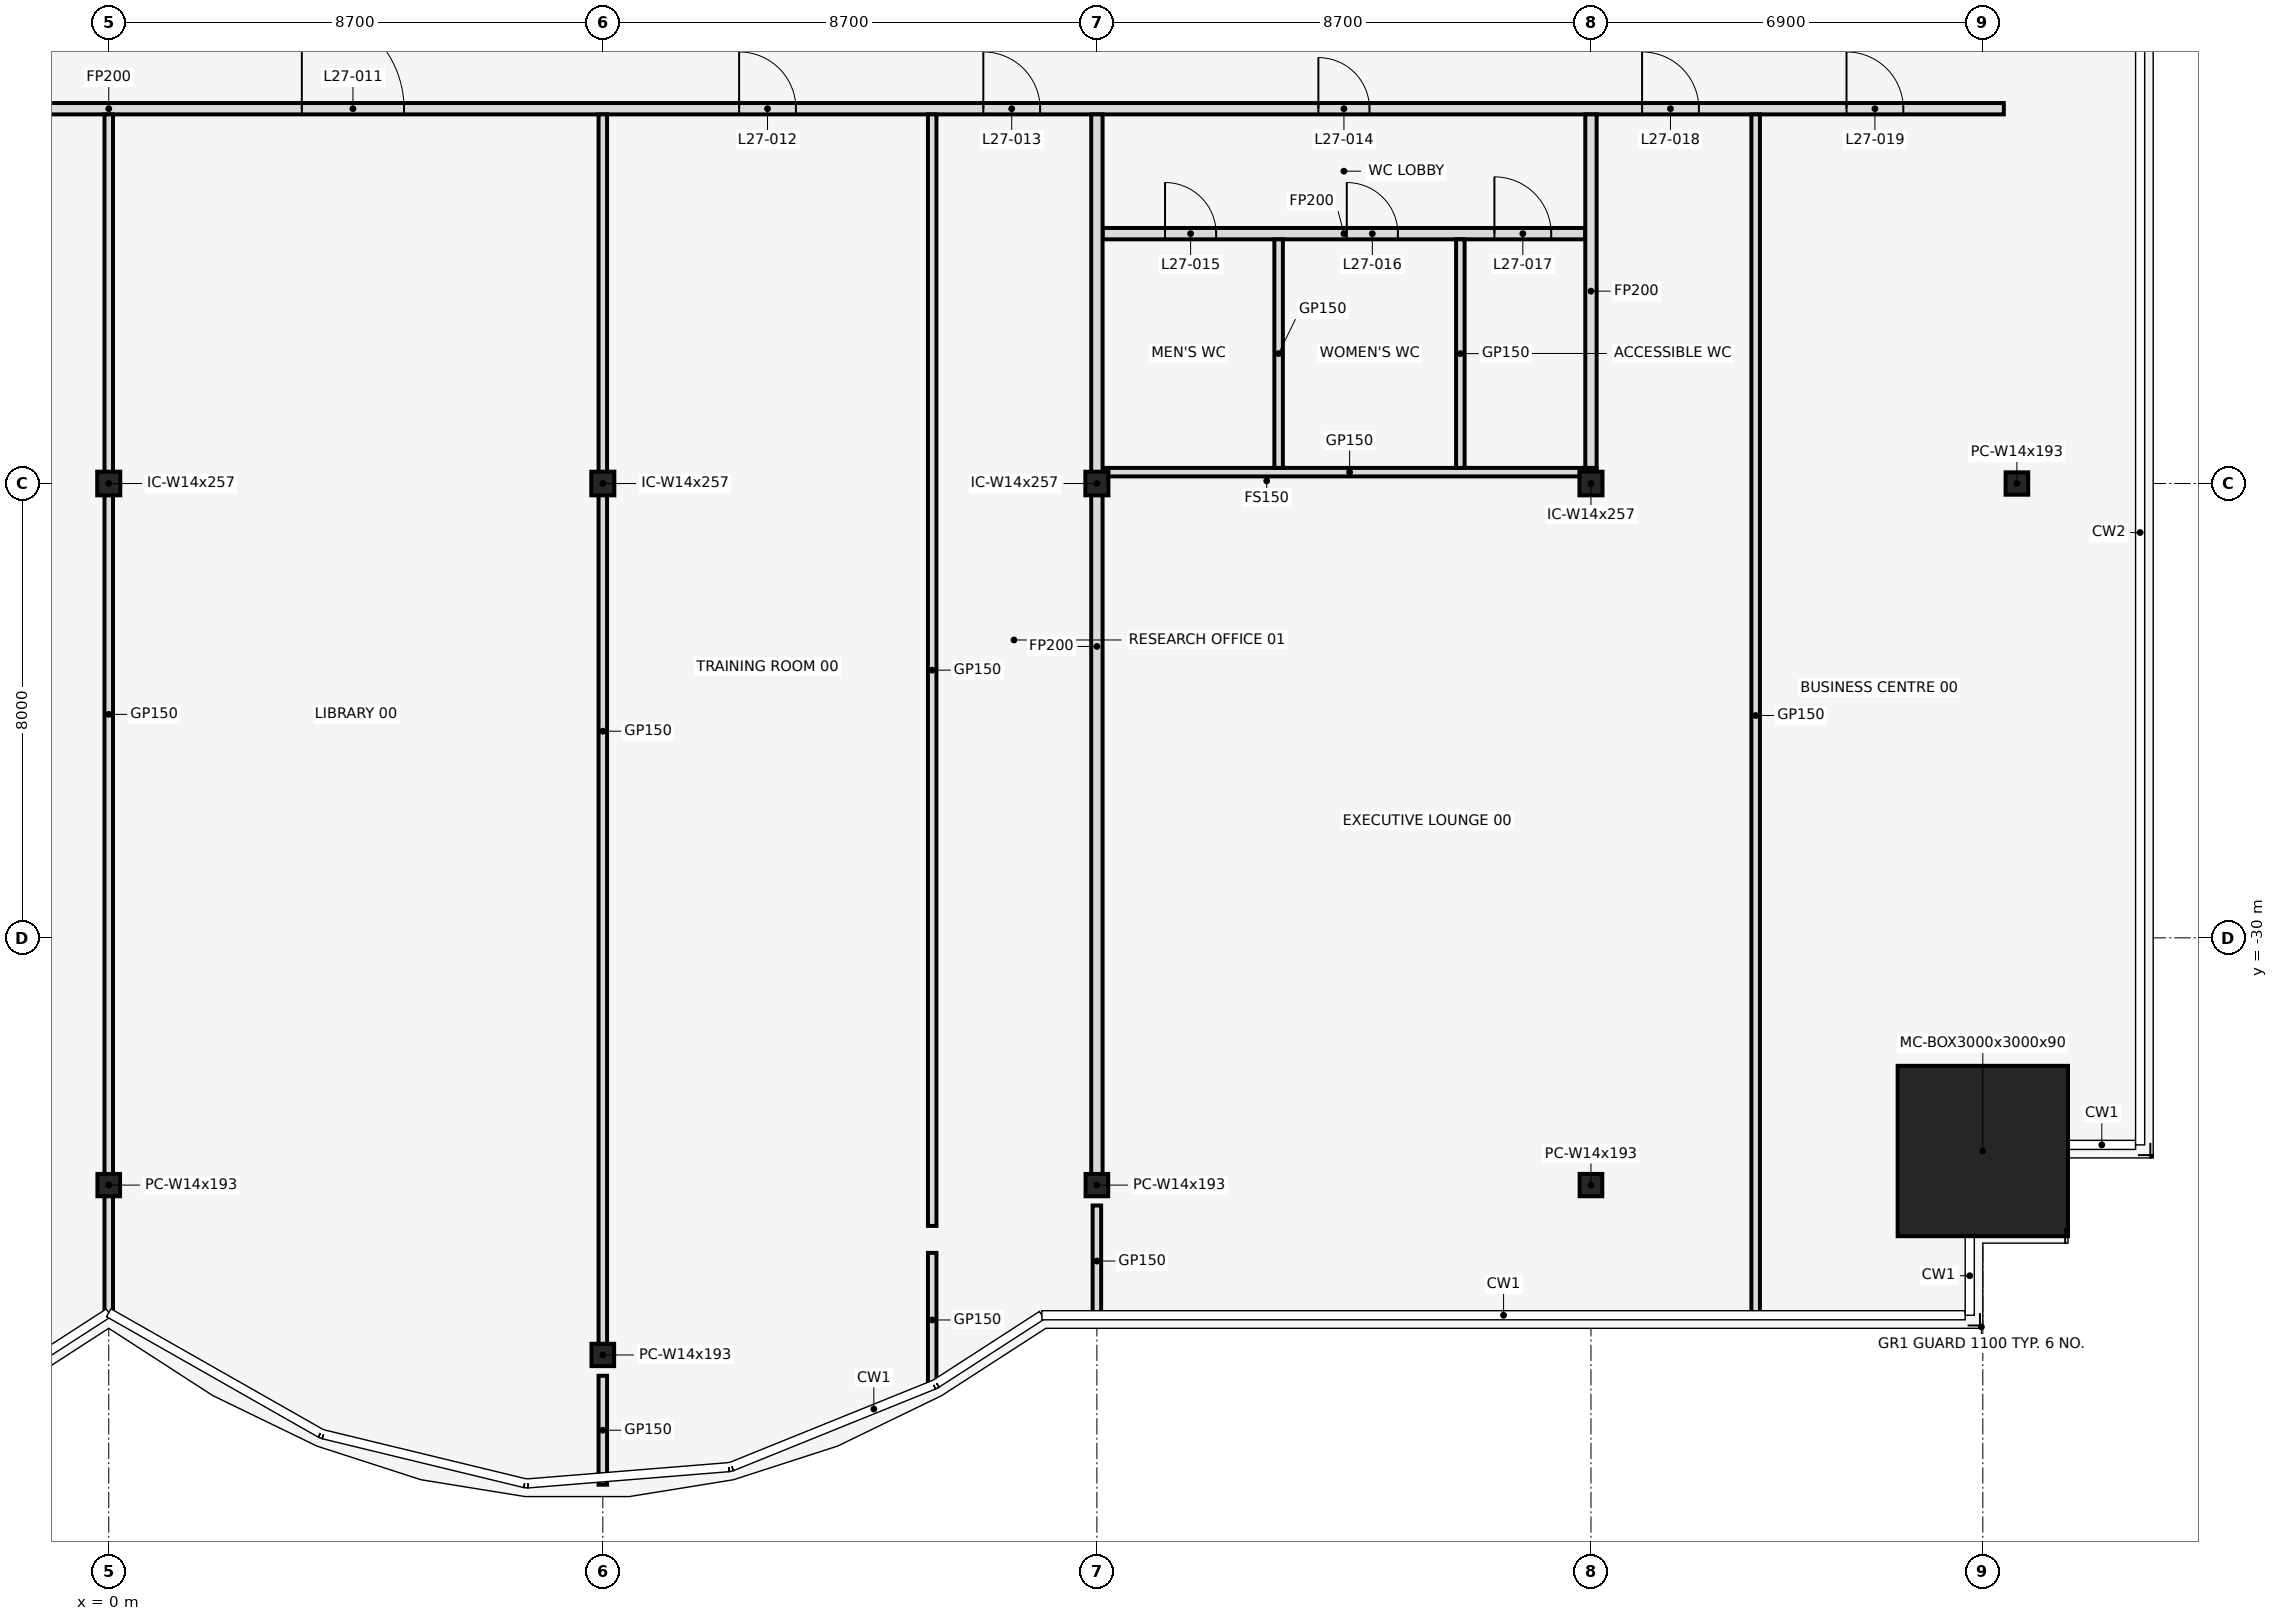
"""IFC4 building model, lengths in metres.
Left out: names, types, materials, properties, quantities, classifications, styles, units other than length and angle.
Written with IfcOpenShell. Run it as: python <this file> out.ifc"""

import sys

from ifc_helpers import new_model, si_unit, direction, frame, frame_2d, origin, origin_2d, place, context, subcontext, project, spatial, rectangle, hollow_rectangle, i_section, extrude, element, fill, save


model = new_model("IFC4")
c1 = context("Model", 3, precision=1e-05, world=origin(), true_north=direction((0.0, 1.0)))
c2 = subcontext(c1, "Body", "Model", "MODEL_VIEW")
j1 = project(units=[si_unit("LENGTHUNIT", "METRE"), si_unit("PLANEANGLEUNIT", "RADIAN")], contexts=[c1])
p1 = place(None, origin())
s1 = spatial("IfcSite", under=j1, at=p1, CompositionType="ELEMENT")
p2 = place(p1, origin())
s2 = spatial("IfcBuilding", under=s1, at=p2, CompositionType="ELEMENT")
p3 = place(p2, frame((0.0, 0.0, 126.8)))
s3 = spatial("IfcBuildingStorey", under=s2, at=p3, CompositionType="ELEMENT", Elevation=126.8)
for number, where, z_axis, x_axis in (
    (1, (0.0, -34.354, 0.0), (0.0, 0.0, 1.0), (1.0, 0.0, 0.0)),
    (2, (8.7, -37.345, 0.0), (0.0, 0.0, 1.0), (1.0, 0.0, 0.0)),
    (3, (17.4, -34.354, 0.0), (0.0, 0.0, 1.0), (1.0, 0.0, 0.0)),
    (4, (26.1, -34.354, 0.0), (0.0, 0.0, 1.0), (1.0, 0.0, 0.0)),
):
    element("IfcColumn", number, at=place(p3, frame(where, z_axis=z_axis, x_axis=x_axis)), inside=s3, PredefinedType="COLUMN", context=c2, shape_type="SweptSolid", body=[
        extrude(i_section(OverallWidth=0.399, OverallDepth=0.394, WebThickness=0.023, FlangeThickness=0.037, at=origin_2d()), origin(), (0.0, 0.0, 1.0), 4.1),
    ])
p4 = place(p3, frame((33.0, -33.754, 0.0), z_axis=(0.0, 0.0, 1.0), x_axis=(1.0, 0.0, 0.0)))
e5 = element("IfcColumn", 5, at=p4, inside=s3, PredefinedType="COLUMN", context=c2, shape_type="SweptSolid", body=[
    extrude(hollow_rectangle(XDim=3.0, YDim=3.0, WallThickness=0.09, at=origin_2d()), origin(), (0.0, 0.0, 1.0), 4.1),
])
p5 = place(p3, frame((33.6, -22.0, 0.0), z_axis=(0.0, 0.0, 1.0), x_axis=(1.0, 0.0, 0.0)))
e6 = element("IfcColumn", 6, at=p5, inside=s3, PredefinedType="COLUMN", context=c2, shape_type="SweptSolid", body=[
    extrude(i_section(OverallWidth=0.399, OverallDepth=0.394, WebThickness=0.023, FlangeThickness=0.037, at=origin_2d()), origin(), (0.0, 0.0, 1.0), 4.1),
])
for number, where, z_axis, x_axis in (
    (7, (0.0, -22.0, 0.0), (0.0, 0.0, 1.0), (1.0, 0.0, 0.0)),
    (8, (8.7, -22.0, 0.0), (0.0, 0.0, 1.0), (1.0, 0.0, 0.0)),
    (9, (17.4, -22.0, 0.0), (0.0, 0.0, 1.0), (1.0, 0.0, 0.0)),
    (10, (26.1, -22.0, 0.0), (0.0, 0.0, 1.0), (1.0, 0.0, 0.0)),
):
    element("IfcColumn", number, at=place(p3, frame(where, z_axis=z_axis, x_axis=x_axis)), inside=s3, PredefinedType="COLUMN", context=c2, shape_type="SweptSolid", body=[
        extrude(i_section(OverallWidth=0.406, OverallDepth=0.417, WebThickness=0.03, FlangeThickness=0.048, at=origin_2d()), origin(), (0.0, 0.0, 1.0), 4.1),
    ])
p6 = place(p3, frame((17.5, -21.8, 0.0), z_axis=(0.0, 0.0, 1.0), x_axis=(1.0, 0.0, 0.0)))
e11 = element("IfcWall", 11, at=p6, inside=s3, PredefinedType="PARTITIONING", context=c2, shape_type="SweptSolid", body=[
    extrude(rectangle(XDim=8.7, YDim=0.15, at=frame_2d((4.35, 0.0))), origin(), (0.0, 0.0, 1.0), 2.939),
])
p7 = place(p3, frame((17.5, -17.6, 0.0), z_axis=(0.0, 0.0, 1.0), x_axis=(1.0, 0.0, 0.0)))
e12 = element("IfcWall", 12, at=p7, inside=s3, PredefinedType="PARTITIONING", context=c2, shape_type="SweptSolid", body=[
    extrude(rectangle(XDim=8.5, YDim=0.2, at=frame_2d((4.25, 0.0))), origin(), (0.0, 0.0, 1.0), 2.939),
])
p8 = place(p7, frame((1.1, 0.0, 0.0)))
e13 = element("IfcOpeningElement", 13, at=p8, cuts=e12, PredefinedType="OPENING", context=c2, shape_type="SweptSolid", body=[
    extrude(rectangle(XDim=0.9, YDim=2.1, at=frame_2d((0.45, 1.05))), frame((0.0, 0.112, 0.0), z_axis=(0.0, -1.0, 0.0), x_axis=(1.0, 0.0, 0.0)), (0.0, 0.0, 1.0), 0.224),
])
p9 = place(p7, frame((4.3, 0.0, 0.0)))
e14 = element("IfcOpeningElement", 14, at=p9, cuts=e12, PredefinedType="OPENING", context=c2, shape_type="SweptSolid", body=[
    extrude(rectangle(XDim=0.9, YDim=2.1, at=frame_2d((0.45, 1.05))), frame((0.0, 0.112, 0.0), z_axis=(0.0, -1.0, 0.0), x_axis=(1.0, 0.0, 0.0)), (0.0, 0.0, 1.0), 0.224),
])
p10 = place(p7, frame((6.9, 0.0, 0.0)))
e15 = element("IfcOpeningElement", 15, at=p10, cuts=e12, PredefinedType="OPENING", context=c2, shape_type="SweptSolid", body=[
    extrude(rectangle(XDim=1.0, YDim=2.1, at=frame_2d((0.5, 1.05))), frame((0.0, 0.112, 0.0), z_axis=(0.0, -1.0, 0.0), x_axis=(1.0, 0.0, 0.0)), (0.0, 0.0, 1.0), 0.224),
])
p11 = place(p3, frame((-33.37, -15.4, 0.0), z_axis=(0.0, 0.0, 1.0), x_axis=(1.0, 0.0, 0.0)))
e16 = element("IfcWall", 16, at=p11, inside=s3, PredefinedType="PARTITIONING", context=c2, shape_type="SweptSolid", body=[
    extrude(rectangle(XDim=66.74, YDim=0.2, at=frame_2d((33.37, 0.0))), origin(), (0.0, 0.0, 1.0), 2.939),
])
p12 = place(p11, frame((1.7, 0.0, 0.0)))
e17 = element("IfcOpeningElement", 17, at=p12, cuts=e16, PredefinedType="OPENING", context=c2, shape_type="SweptSolid", body=[
    extrude(rectangle(XDim=1.0, YDim=2.1, at=frame_2d((0.5, 1.05))), frame((0.0, 0.112, 0.0), z_axis=(0.0, -1.0, 0.0), x_axis=(1.0, 0.0, 0.0)), (0.0, 0.0, 1.0), 0.224),
])
p13 = place(p11, frame((11.07, 0.0, 0.0)))
e18 = element("IfcOpeningElement", 18, at=p13, cuts=e16, PredefinedType="OPENING", context=c2, shape_type="SweptSolid", body=[
    extrude(rectangle(XDim=1.0, YDim=2.1, at=frame_2d((0.5, 1.05))), frame((0.0, 0.112, 0.0), z_axis=(0.0, -1.0, 0.0), x_axis=(1.0, 0.0, 0.0)), (0.0, 0.0, 1.0), 0.224),
])
p14 = place(p11, frame((20.87, 0.0, 0.0)))
e19 = element("IfcOpeningElement", 19, at=p14, cuts=e16, PredefinedType="OPENING", context=c2, shape_type="SweptSolid", body=[
    extrude(rectangle(XDim=1.8, YDim=2.1, at=frame_2d((0.9, 1.05))), frame((0.0, 0.112, 0.0), z_axis=(0.0, -1.0, 0.0), x_axis=(1.0, 0.0, 0.0)), (0.0, 0.0, 1.0), 0.224),
])
p15 = place(p11, frame((28.57, 0.0, 0.0)))
e20 = element("IfcOpeningElement", 20, at=p15, cuts=e16, PredefinedType="OPENING", context=c2, shape_type="SweptSolid", body=[
    extrude(rectangle(XDim=1.0, YDim=2.1, at=frame_2d((0.5, 1.05))), frame((0.0, 0.112, 0.0), z_axis=(0.0, -1.0, 0.0), x_axis=(1.0, 0.0, 0.0)), (0.0, 0.0, 1.0), 0.224),
])
p16 = place(p11, frame((36.77, 0.0, 0.0)))
e21 = element("IfcOpeningElement", 21, at=p16, cuts=e16, PredefinedType="OPENING", context=c2, shape_type="SweptSolid", body=[
    extrude(rectangle(XDim=1.8, YDim=2.1, at=frame_2d((0.9, 1.05))), frame((0.0, 0.112, 0.0), z_axis=(0.0, -1.0, 0.0), x_axis=(1.0, 0.0, 0.0)), (0.0, 0.0, 1.0), 0.224),
])
p17 = place(p11, frame((44.47, 0.0, 0.0)))
e22 = element("IfcOpeningElement", 22, at=p17, cuts=e16, PredefinedType="OPENING", context=c2, shape_type="SweptSolid", body=[
    extrude(rectangle(XDim=1.0, YDim=2.1, at=frame_2d((0.5, 1.05))), frame((0.0, 0.112, 0.0), z_axis=(0.0, -1.0, 0.0), x_axis=(1.0, 0.0, 0.0)), (0.0, 0.0, 1.0), 0.224),
])
p18 = place(p11, frame((48.77, 0.0, 0.0)))
e23 = element("IfcOpeningElement", 23, at=p18, cuts=e16, PredefinedType="OPENING", context=c2, shape_type="SweptSolid", body=[
    extrude(rectangle(XDim=1.0, YDim=2.1, at=frame_2d((0.5, 1.05))), frame((0.0, 0.112, 0.0), z_axis=(0.0, -1.0, 0.0), x_axis=(1.0, 0.0, 0.0)), (0.0, 0.0, 1.0), 0.224),
])
p19 = place(p11, frame((54.67, 0.0, 0.0)))
e24 = element("IfcOpeningElement", 24, at=p19, cuts=e16, PredefinedType="OPENING", context=c2, shape_type="SweptSolid", body=[
    extrude(rectangle(XDim=0.9, YDim=2.1, at=frame_2d((0.45, 1.05))), frame((0.0, 0.112, 0.0), z_axis=(0.0, -1.0, 0.0), x_axis=(1.0, 0.0, 0.0)), (0.0, 0.0, 1.0), 0.224),
])
p20 = place(p11, frame((60.37, 0.0, 0.0)))
e25 = element("IfcOpeningElement", 25, at=p20, cuts=e16, PredefinedType="OPENING", context=c2, shape_type="SweptSolid", body=[
    extrude(rectangle(XDim=1.0, YDim=2.1, at=frame_2d((0.5, 1.05))), frame((0.0, 0.112, 0.0), z_axis=(0.0, -1.0, 0.0), x_axis=(1.0, 0.0, 0.0)), (0.0, 0.0, 1.0), 0.224),
])
p21 = place(p11, frame((63.97, 0.0, 0.0)))
e26 = element("IfcOpeningElement", 26, at=p21, cuts=e16, PredefinedType="OPENING", context=c2, shape_type="SweptSolid", body=[
    extrude(rectangle(XDim=1.0, YDim=2.1, at=frame_2d((0.5, 1.05))), frame((0.0, 0.112, 0.0), z_axis=(0.0, -1.0, 0.0), x_axis=(1.0, 0.0, 0.0)), (0.0, 0.0, 1.0), 0.224),
])
p22 = place(p3, frame((0.0, -36.63, 0.0), z_axis=(0.0, 0.0, 1.0), x_axis=(0.0, 1.0, 0.0)))
e27 = element("IfcWall", 27, at=p22, inside=s3, PredefinedType="PARTITIONING", context=c2, shape_type="SweptSolid", body=[
    extrude(rectangle(XDim=21.13, YDim=0.15, at=frame_2d((10.565, 0.0))), origin(), (0.0, 0.0, 1.0), 2.939),
])
p23 = place(p3, frame((8.7, -39.63, 0.0), z_axis=(0.0, 0.0, 1.0), x_axis=(0.0, 1.0, 0.0)))
e28 = element("IfcWall", 28, at=p23, inside=s3, PredefinedType="PARTITIONING", context=c2, shape_type="SweptSolid", body=[
    extrude(rectangle(XDim=1.919, YDim=0.15, at=frame_2d((0.959, 0.0))), origin(), (0.0, 0.0, 1.0), 2.939),
])
p24 = place(p3, frame((8.7, -37.223, 0.0), z_axis=(0.0, 0.0, 1.0), x_axis=(0.0, 1.0, 0.0)))
e29 = element("IfcWall", 29, at=p24, inside=s3, PredefinedType="PARTITIONING", context=c2, shape_type="SweptSolid", body=[
    extrude(rectangle(XDim=21.723, YDim=0.15, at=frame_2d((10.862, 0.0))), origin(), (0.0, 0.0, 1.0), 2.939),
])
p25 = place(p3, frame((14.5, -37.91, 0.0), z_axis=(0.0, 0.0, 1.0), x_axis=(0.0, 1.0, 0.0)))
e30 = element("IfcWall", 30, at=p25, inside=s3, PredefinedType="PARTITIONING", context=c2, shape_type="SweptSolid", body=[
    extrude(rectangle(XDim=2.362, YDim=0.15, at=frame_2d((1.181, 0.0))), origin(), (0.0, 0.0, 1.0), 2.939),
])
p26 = place(p3, frame((14.5, -35.073, 0.0), z_axis=(0.0, 0.0, 1.0), x_axis=(0.0, 1.0, 0.0)))
e31 = element("IfcWall", 31, at=p26, inside=s3, PredefinedType="PARTITIONING", context=c2, shape_type="SweptSolid", body=[
    extrude(rectangle(XDim=19.573, YDim=0.15, at=frame_2d((9.787, 0.0))), origin(), (0.0, 0.0, 1.0), 2.939),
])
p27 = place(p3, frame((17.4, -36.67, 0.0), z_axis=(0.0, 0.0, 1.0), x_axis=(0.0, 1.0, 0.0)))
e32 = element("IfcWall", 32, at=p27, inside=s3, PredefinedType="PARTITIONING", context=c2, shape_type="SweptSolid", body=[
    extrude(rectangle(XDim=1.957, YDim=0.15, at=frame_2d((0.978, 0.0))), origin(), (0.0, 0.0, 1.0), 2.939),
])
p28 = place(p3, frame((17.4, -34.239, 0.0), z_axis=(0.0, 0.0, 1.0), x_axis=(0.0, 1.0, 0.0)))
e33 = element("IfcWall", 33, at=p28, inside=s3, PredefinedType="PARTITIONING", context=c2, shape_type="SweptSolid", body=[
    extrude(rectangle(XDim=18.739, YDim=0.2, at=frame_2d((9.369, 0.0))), origin(), (0.0, 0.0, 1.0), 2.939),
])
for number, where, z_axis, x_axis in (
    (34, (20.6, -21.725, 0.0), (0.0, 0.0, 1.0), (0.0, 1.0, 0.0)),
    (35, (23.8, -21.725, 0.0), (0.0, 0.0, 1.0), (0.0, 1.0, 0.0)),
):
    element("IfcWall", number, at=place(p3, frame(where, z_axis=z_axis, x_axis=x_axis)), inside=s3, PredefinedType="PARTITIONING", context=c2, shape_type="SweptSolid", body=[
        extrude(rectangle(XDim=4.025, YDim=0.15, at=frame_2d((2.013, 0.0))), origin(), (0.0, 0.0, 1.0), 2.939),
    ])
p29 = place(p3, frame((26.1, -21.725, 0.0), z_axis=(0.0, 0.0, 1.0), x_axis=(0.0, 1.0, 0.0)))
e36 = element("IfcWall", 36, at=p29, inside=s3, PredefinedType="PARTITIONING", context=c2, shape_type="SweptSolid", body=[
    extrude(rectangle(XDim=6.225, YDim=0.2, at=frame_2d((3.113, 0.0))), origin(), (0.0, 0.0, 1.0), 2.939),
])
p30 = place(p3, frame((29.0, -36.67, 0.0), z_axis=(0.0, 0.0, 1.0), x_axis=(0.0, 1.0, 0.0)))
e37 = element("IfcWall", 37, at=p30, inside=s3, PredefinedType="PARTITIONING", context=c2, shape_type="SweptSolid", body=[
    extrude(rectangle(XDim=21.17, YDim=0.15, at=frame_2d((10.585, 0.0))), origin(), (0.0, 0.0, 1.0), 2.939),
])
p31 = place(p16, origin())
e38 = element("IfcDoor", 38, at=p31, inside=s3, OperationType="SINGLE_SWING_LEFT", PredefinedType="DOOR", context=c2, shape_type="SweptSolid", body=[
    extrude(rectangle(XDim=1.8, YDim=2.1, at=frame_2d((0.9, 1.05))), frame((0.0, 0.025, 0.0), z_axis=(0.0, -1.0, 0.0), x_axis=(1.0, 0.0, 0.0)), (0.0, 0.0, 1.0), 0.05),
])
fill(e21, e38)
p32 = place(p17, frame((1.0, 0.0, 0.0), z_axis=(0.0, 0.0, 1.0), x_axis=(-1.0, 0.0, 0.0)))
e39 = element("IfcDoor", 39, at=p32, inside=s3, OperationType="SINGLE_SWING_RIGHT", PredefinedType="DOOR", context=c2, shape_type="SweptSolid", body=[
    extrude(rectangle(XDim=1.0, YDim=2.1, at=frame_2d((0.5, 1.05))), frame((0.0, 0.025, 0.0), z_axis=(0.0, -1.0, 0.0), x_axis=(1.0, 0.0, 0.0)), (0.0, 0.0, 1.0), 0.05),
])
fill(e22, e39)
p33 = place(p18, frame((1.0, 0.0, 0.0), z_axis=(0.0, 0.0, 1.0), x_axis=(-1.0, 0.0, 0.0)))
e40 = element("IfcDoor", 40, at=p33, inside=s3, OperationType="SINGLE_SWING_LEFT", PredefinedType="DOOR", context=c2, shape_type="SweptSolid", body=[
    extrude(rectangle(XDim=1.0, YDim=2.1, at=frame_2d((0.5, 1.05))), frame((0.0, 0.025, 0.0), z_axis=(0.0, -1.0, 0.0), x_axis=(1.0, 0.0, 0.0)), (0.0, 0.0, 1.0), 0.05),
])
fill(e23, e40)
p34 = place(p19, frame((0.9, 0.0, 0.0), z_axis=(0.0, 0.0, 1.0), x_axis=(-1.0, 0.0, 0.0)))
e41 = element("IfcDoor", 41, at=p34, inside=s3, OperationType="SINGLE_SWING_RIGHT", PredefinedType="DOOR", context=c2, shape_type="SweptSolid", body=[
    extrude(rectangle(XDim=0.9, YDim=2.1, at=frame_2d((0.45, 1.05))), frame((0.0, 0.025, 0.0), z_axis=(0.0, -1.0, 0.0), x_axis=(1.0, 0.0, 0.0)), (0.0, 0.0, 1.0), 0.05),
])
fill(e24, e41)
p35 = place(p8, frame((0.9, 0.0, 0.0), z_axis=(0.0, 0.0, 1.0), x_axis=(-1.0, 0.0, 0.0)))
e42 = element("IfcDoor", 42, at=p35, inside=s3, OperationType="SINGLE_SWING_RIGHT", PredefinedType="DOOR", context=c2, shape_type="SweptSolid", body=[
    extrude(rectangle(XDim=0.9, YDim=2.1, at=frame_2d((0.45, 1.05))), frame((0.0, 0.025, 0.0), z_axis=(0.0, -1.0, 0.0), x_axis=(1.0, 0.0, 0.0)), (0.0, 0.0, 1.0), 0.05),
])
fill(e13, e42)
p36 = place(p9, frame((0.9, 0.0, 0.0), z_axis=(0.0, 0.0, 1.0), x_axis=(-1.0, 0.0, 0.0)))
e43 = element("IfcDoor", 43, at=p36, inside=s3, OperationType="SINGLE_SWING_LEFT", PredefinedType="DOOR", context=c2, shape_type="SweptSolid", body=[
    extrude(rectangle(XDim=0.9, YDim=2.1, at=frame_2d((0.45, 1.05))), frame((0.0, 0.025, 0.0), z_axis=(0.0, -1.0, 0.0), x_axis=(1.0, 0.0, 0.0)), (0.0, 0.0, 1.0), 0.05),
])
fill(e14, e43)
p37 = place(p10, frame((1.0, 0.0, 0.0), z_axis=(0.0, 0.0, 1.0), x_axis=(-1.0, 0.0, 0.0)))
e44 = element("IfcDoor", 44, at=p37, inside=s3, OperationType="SINGLE_SWING_RIGHT", PredefinedType="DOOR", context=c2, shape_type="SweptSolid", body=[
    extrude(rectangle(XDim=1.0, YDim=2.1, at=frame_2d((0.5, 1.05))), frame((0.0, 0.025, 0.0), z_axis=(0.0, -1.0, 0.0), x_axis=(1.0, 0.0, 0.0)), (0.0, 0.0, 1.0), 0.05),
])
fill(e15, e44)
p38 = place(p20, frame((1.0, 0.0, 0.0), z_axis=(0.0, 0.0, 1.0), x_axis=(-1.0, 0.0, 0.0)))
e45 = element("IfcDoor", 45, at=p38, inside=s3, OperationType="SINGLE_SWING_RIGHT", PredefinedType="DOOR", context=c2, shape_type="SweptSolid", body=[
    extrude(rectangle(XDim=1.0, YDim=2.1, at=frame_2d((0.5, 1.05))), frame((0.0, 0.025, 0.0), z_axis=(0.0, -1.0, 0.0), x_axis=(1.0, 0.0, 0.0)), (0.0, 0.0, 1.0), 0.05),
])
fill(e25, e45)
p39 = place(p21, frame((1.0, 0.0, 0.0), z_axis=(0.0, 0.0, 1.0), x_axis=(-1.0, 0.0, 0.0)))
e46 = element("IfcDoor", 46, at=p39, inside=s3, OperationType="SINGLE_SWING_LEFT", PredefinedType="DOOR", context=c2, shape_type="SweptSolid", body=[
    extrude(rectangle(XDim=1.0, YDim=2.1, at=frame_2d((0.5, 1.05))), frame((0.0, 0.025, 0.0), z_axis=(0.0, -1.0, 0.0), x_axis=(1.0, 0.0, 0.0)), (0.0, 0.0, 1.0), 0.05),
])
fill(e26, e46)
save(model, sys.argv[1])
